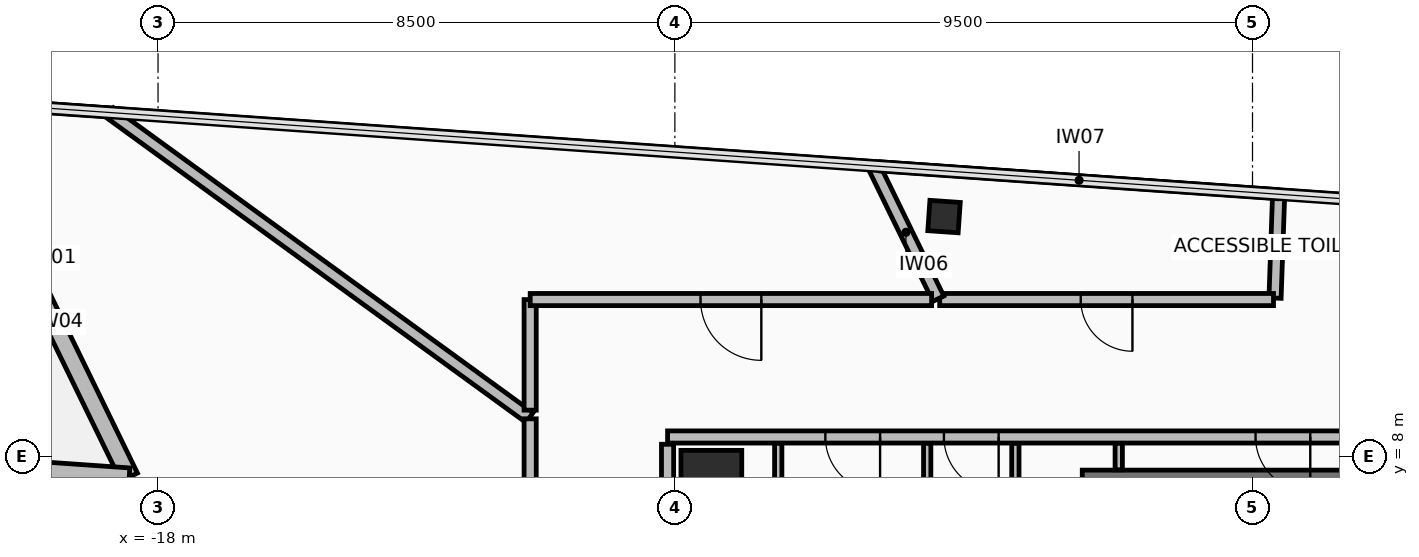
"""IFC4 building model, lengths in metres.
Left out: names, types, materials, properties, quantities, classifications, styles, units other than length and angle.
Written with IfcOpenShell. Run it as: python <this file> out.ifc"""

import sys

from ifc_helpers import new_model, si_unit, direction, frame, frame_2d, origin, origin_2d, place, context, subcontext, project, spatial, rectangle, hollow_rectangle, extrude, element, fill, save


model = new_model("IFC4")
c1 = context("Model", 3, precision=1e-05, world=origin(), true_north=direction((0.0, 1.0)))
c2 = subcontext(c1, "Body", "Model", "MODEL_VIEW")
j1 = project(units=[si_unit("LENGTHUNIT", "METRE"), si_unit("PLANEANGLEUNIT", "RADIAN")], contexts=[c1])
p1 = place(None, origin())
s1 = spatial("IfcSite", under=j1, at=p1, CompositionType="ELEMENT")
p2 = place(p1, origin())
s2 = spatial("IfcBuilding", under=s1, at=p2, CompositionType="ELEMENT")
p3 = place(p2, frame((0.0, 0.0, 237.85)))
s3 = spatial("IfcBuildingStorey", under=s2, at=p3, CompositionType="ELEMENT", Elevation=237.85)
p4 = place(p3, frame((-8.9, 7.6, 0.0), z_axis=(0.0, 0.0, 1.0), x_axis=(1.0, 0.0, 0.0)))
e1 = element("IfcColumn", 1, at=p4, inside=s3, PredefinedType="COLUMN", context=c2, shape_type="SweptSolid", body=[
    extrude(rectangle(XDim=1.0, YDim=1.0, at=origin_2d()), origin(), (0.0, 0.0, 1.0), 3.6),
])
p5 = place(p3, frame((-5.073, 11.945, 0.0), z_axis=(0.0, 0.0, 1.0), x_axis=(-0.99756405026, 0.069756473744, 0.0)))
e2 = element("IfcColumn", 2, at=p5, inside=s3, PredefinedType="COLUMN", context=c2, shape_type="SweptSolid", body=[
    extrude(hollow_rectangle(XDim=0.5, YDim=0.5, WallThickness=0.032, at=origin_2d()), origin(), (0.0, 0.0, 1.0), 3.6),
])
p6 = place(p3, frame((-21.49, 13.844, 0.0), z_axis=(0.0, 0.0, 1.0), x_axis=(0.438391471143, -0.898784133165, 0.0)))
e3 = element("IfcWall", 3, at=p6, inside=s3, PredefinedType="STANDARD", context=c2, shape_type="SweptSolid", body=[
    extrude(rectangle(XDim=6.88, YDim=0.3, at=frame_2d((3.44, 0.0))), origin(), (0.0, 0.0, 1.0), 2.765),
])
p7 = place(p6, frame((2.84, 0.0, 0.485)))
e4 = element("IfcOpeningElement", 4, at=p7, cuts=e3, PredefinedType="OPENING", context=c2, shape_type="SweptSolid", body=[
    extrude(rectangle(XDim=1.2, YDim=2.1, at=frame_2d((0.6, 1.05))), frame((0.0, 0.16, 0.0), z_axis=(0.0, -1.0, 0.0), x_axis=(1.0, 0.0, 0.0)), (0.0, 0.0, 1.0), 0.32),
])
p8 = place(p3, frame((-18.474, 7.661, 0.0), z_axis=(0.0, 0.0, 1.0), x_axis=(-0.997565982203, 0.069728840176, 0.0)))
e5 = element("IfcWall", 5, at=p8, inside=s3, PredefinedType="STANDARD", context=c2, shape_type="SweptSolid", body=[
    extrude(rectangle(XDim=6.88, YDim=0.3, at=frame_2d((3.44, 0.0))), origin(), (0.0, 0.0, 1.0), 2.765),
])
p9 = place(p8, frame((2.532, 0.0, 0.0)))
e6 = element("IfcOpeningElement", 6, at=p9, cuts=e5, PredefinedType="OPENING", context=c2, shape_type="SweptSolid", body=[
    extrude(rectangle(XDim=1.1, YDim=2.2, at=frame_2d((0.55, 1.1))), frame((0.0, 0.16, 0.0), z_axis=(0.0, -1.0, 0.0), x_axis=(1.0, 0.0, 0.0)), (0.0, 0.0, 1.0), 0.32),
])
p10 = place(p3, frame((-2.8, 7.6, 0.0), z_axis=(0.0, 0.0, 1.0), x_axis=(1.0, 0.0, 0.0)))
e7 = element("IfcWall", 7, at=p10, inside=s3, PredefinedType="SHEAR", context=c2, shape_type="SweptSolid", body=[
    extrude(rectangle(XDim=5.38, YDim=0.35, at=frame_2d((2.69, 0.0))), origin(), (0.0, 0.0, 1.0), 3.42),
])
p11 = place(p3, frame((9.62, 8.32, 0.0), z_axis=(0.0, 0.0, 1.0), x_axis=(-1.0, 0.0, 0.0)))
e8 = element("IfcWall", 8, at=p11, inside=s3, PredefinedType="PARTITIONING", context=c2, shape_type="SweptSolid", body=[
    extrude(rectangle(XDim=19.24, YDim=0.2, at=frame_2d((9.62, 0.0))), origin(), (0.0, 0.0, 1.0), 2.915),
])
p12 = place(p11, frame((8.67, 0.0, 0.0)))
e9 = element("IfcOpeningElement", 9, at=p12, cuts=e8, PredefinedType="OPENING", context=c2, shape_type="SweptSolid", body=[
    extrude(rectangle(XDim=0.9, YDim=2.1, at=frame_2d((0.45, 1.05))), frame((0.0, 0.11, 0.0), z_axis=(0.0, -1.0, 0.0), x_axis=(1.0, 0.0, 0.0)), (0.0, 0.0, 1.0), 0.22),
])
p13 = place(p11, frame((15.745, 0.0, 0.0)))
e10 = element("IfcOpeningElement", 10, at=p13, cuts=e8, PredefinedType="OPENING", context=c2, shape_type="SweptSolid", body=[
    extrude(rectangle(XDim=0.9, YDim=2.1, at=frame_2d((0.45, 1.05))), frame((0.0, 0.11, 0.0), z_axis=(0.0, -1.0, 0.0), x_axis=(1.0, 0.0, 0.0)), (0.0, 0.0, 1.0), 0.22),
])
p14 = place(p11, frame((13.795, 0.0, 0.0)))
e11 = element("IfcOpeningElement", 11, at=p14, cuts=e8, PredefinedType="OPENING", context=c2, shape_type="SweptSolid", body=[
    extrude(rectangle(XDim=0.9, YDim=2.1, at=frame_2d((0.45, 1.05))), frame((0.0, 0.11, 0.0), z_axis=(0.0, -1.0, 0.0), x_axis=(1.0, 0.0, 0.0)), (0.0, 0.0, 1.0), 0.22),
])
p15 = place(p3, frame((-9.62, 8.2, 0.0), z_axis=(0.0, 0.0, 1.0), x_axis=(0.0, -1.0, 0.0)))
e12 = element("IfcWall", 12, at=p15, inside=s3, PredefinedType="PARTITIONING", context=c2, shape_type="SweptSolid", body=[
    extrude(rectangle(XDim=16.4, YDim=0.2, at=frame_2d((8.2, 0.0))), origin(), (0.0, 0.0, 1.0), 2.765),
])
p16 = place(p15, frame((12.65, 0.0, 0.0)))
e13 = element("IfcOpeningElement", 13, at=p16, cuts=e12, PredefinedType="OPENING", context=c2, shape_type="SweptSolid", body=[
    extrude(rectangle(XDim=1.1, YDim=2.15, at=frame_2d((0.55, 1.075))), frame((0.0, 0.11, 0.0), z_axis=(0.0, -1.0, 0.0), x_axis=(1.0, 0.0, 0.0)), (0.0, 0.0, 1.0), 0.22),
])
p17 = place(p3, frame((-2.2, 8.215, 0.0), z_axis=(0.0, 0.0, 1.0), x_axis=(0.0, -1.0, 0.0)))
e14 = element("IfcWall", 14, at=p17, inside=s3, PredefinedType="PARTITIONING", context=c2, shape_type="SweptSolid", body=[
    extrude(rectangle(XDim=0.435, YDim=0.12, at=frame_2d((0.218, 0.0))), origin(), (0.0, 0.0, 1.0), 2.715),
])
for number, where, z_axis, x_axis in (
    (15, (-5.35, 4.765, 0.0), (0.0, 0.0, 1.0), (0.0, 1.0, 0.0)),
    (16, (-7.8, 8.215, 0.0), (0.0, 0.0, 1.0), (0.0, -1.0, 0.0)),
    (17, (-3.9, 4.765, 0.0), (0.0, 0.0, 1.0), (0.0, 1.0, 0.0)),
):
    element("IfcWall", number, at=place(p3, frame(where, z_axis=z_axis, x_axis=x_axis)), inside=s3, PredefinedType="PARTITIONING", context=c2, shape_type="SweptSolid", body=[
        extrude(rectangle(XDim=3.45, YDim=0.12, at=frame_2d((1.725, 0.0))), origin(), (0.0, 0.0, 1.0), 2.715),
    ])
p18 = place(p3, frame((0.429, 12.288, 0.0), z_axis=(0.0, 0.0, 1.0), x_axis=(-0.034926473635, -0.999389884599, 0.0)))
e18 = element("IfcWall", 18, at=p18, inside=s3, PredefinedType="PARTITIONING", context=c2, shape_type="SweptSolid", body=[
    extrude(rectangle(XDim=1.685, YDim=0.2, at=frame_2d((0.842, 0.0))), origin(), (0.0, 0.0, 1.0), 2.765),
])
p19 = place(p3, frame((0.345, 10.58, 0.0), z_axis=(0.0, 0.0, 1.0), x_axis=(-1.0, 0.0, 0.0)))
e19 = element("IfcWall", 19, at=p19, inside=s3, PredefinedType="PARTITIONING", context=c2, shape_type="SweptSolid", body=[
    extrude(rectangle(XDim=5.49, YDim=0.2, at=frame_2d((2.745, 0.0))), origin(), (0.0, 0.0, 1.0), 3.42),
])
p20 = place(p19, frame((2.32, 0.0, 0.0)))
e20 = element("IfcOpeningElement", 20, at=p20, cuts=e19, PredefinedType="OPENING", context=c2, shape_type="SweptSolid", body=[
    extrude(rectangle(XDim=0.85, YDim=2.1, at=frame_2d((0.425, 1.05))), frame((0.0, 0.11, 0.0), z_axis=(0.0, -1.0, 0.0), x_axis=(1.0, 0.0, 0.0)), (0.0, 0.0, 1.0), 0.22),
])
p21 = place(p3, frame((-5.167, 10.594, 0.0), z_axis=(0.0, 0.0, 1.0), x_axis=(-0.43834839389, 0.898805143273, 0.0)))
e21 = element("IfcWall", 21, at=p21, inside=s3, PredefinedType="PARTITIONING", context=c2, shape_type="SweptSolid", body=[
    extrude(rectangle(XDim=2.429, YDim=0.2, at=frame_2d((1.215, 0.0))), origin(), (0.0, 0.0, 1.0), 2.765),
])
p22 = place(p3, frame((-6.111, 12.769, 0.0), z_axis=(0.0, 0.0, 1.0), x_axis=(0.997565678714, -0.069733181857, 0.0)))
e22 = element("IfcWall", 22, at=p22, inside=s3, PredefinedType="PARTITIONING", context=c2, shape_type="SweptSolid", body=[
    extrude(rectangle(XDim=6.533, YDim=0.15, at=frame_2d((3.267, 0.0))), origin(), (0.0, 0.0, 1.0), 3.42),
])
p23 = place(p3, frame((-21.311, 13.832, 0.0), z_axis=(0.0, 0.0, 1.0), x_axis=(0.997559711148, -0.06981849823, 0.0)))
e23 = element("IfcWall", 23, at=p23, inside=s3, PredefinedType="PARTITIONING", context=c2, shape_type="SweptSolid", body=[
    extrude(rectangle(XDim=2.514, YDim=0.15, at=frame_2d((1.257, 0.0))), origin(), (0.0, 0.0, 1.0), 3.42),
])
p24 = place(p3, frame((-18.79, 13.652, 0.0), z_axis=(0.0, 0.0, 1.0), x_axis=(0.809024412074, -0.58777504257, 0.0)))
e24 = element("IfcWall", 24, at=p24, inside=s3, PredefinedType="PARTITIONING", context=c2, shape_type="SweptSolid", body=[
    extrude(rectangle(XDim=8.529, YDim=0.2, at=frame_2d((4.264, 0.0))), origin(), (0.0, 0.0, 1.0), 2.765),
])
p25 = place(p3, frame((-11.88, 8.619, 0.0), z_axis=(0.0, 0.0, 1.0), x_axis=(0.0, -1.0, 0.0)))
e25 = element("IfcWall", 25, at=p25, inside=s3, PredefinedType="PARTITIONING", context=c2, shape_type="SweptSolid", body=[
    extrude(rectangle(XDim=6.92, YDim=0.2, at=frame_2d((3.46, 0.0))), origin(), (0.0, 0.0, 1.0), 2.765),
])
p26 = place(p25, frame((3.035, 0.0, 0.0)))
e26 = element("IfcOpeningElement", 26, at=p26, cuts=e25, PredefinedType="OPENING", context=c2, shape_type="SweptSolid", body=[
    extrude(rectangle(XDim=0.85, YDim=2.1, at=frame_2d((0.425, 1.05))), frame((0.0, 0.11, 0.0), z_axis=(0.0, -1.0, 0.0), x_axis=(1.0, 0.0, 0.0)), (0.0, 0.0, 1.0), 0.22),
])
p27 = place(p3, frame((-11.88, 10.579, 0.0), z_axis=(0.0, 0.0, 1.0), x_axis=(0.0, -1.0, 0.0)))
e27 = element("IfcWall", 27, at=p27, inside=s3, PredefinedType="PARTITIONING", context=c2, shape_type="SweptSolid", body=[
    extrude(rectangle(XDim=1.818, YDim=0.2, at=frame_2d((0.909, 0.0))), origin(), (0.0, 0.0, 1.0), 2.915),
])
p28 = place(p3, frame((-5.277, 10.58, 0.0), z_axis=(0.0, 0.0, 1.0), x_axis=(-1.0, 0.0, 0.0)))
e28 = element("IfcWall", 28, at=p28, inside=s3, PredefinedType="PARTITIONING", context=c2, shape_type="SweptSolid", body=[
    extrude(rectangle(XDim=6.602, YDim=0.2, at=frame_2d((3.301, 0.0))), origin(), (0.0, 0.0, 1.0), 2.915),
])
p29 = place(p28, frame((2.801, 0.0, 0.0)))
e29 = element("IfcOpeningElement", 29, at=p29, cuts=e28, PredefinedType="OPENING", context=c2, shape_type="SweptSolid", body=[
    extrude(rectangle(XDim=1.0, YDim=2.15, at=frame_2d((0.5, 1.075))), frame((0.0, 0.11, 0.0), z_axis=(0.0, -1.0, 0.0), x_axis=(1.0, 0.0, 0.0)), (0.0, 0.0, 1.0), 0.22),
])
p30 = place(p7, origin())
e30 = element("IfcWindow", 30, at=p30, inside=s3, PartitioningType="SINGLE_PANEL", PredefinedType="WINDOW", context=c2, shape_type="SweptSolid", body=[
    extrude(rectangle(XDim=1.2, YDim=2.1, at=frame_2d((0.6, 1.05))), frame((0.0, 0.03, 0.0), z_axis=(0.0, -1.0, 0.0), x_axis=(1.0, 0.0, 0.0)), (0.0, 0.0, 1.0), 0.06),
])
fill(e4, e30)
p31 = place(p12, origin())
e31 = element("IfcDoor", 31, at=p31, inside=s3, OperationType="SINGLE_SWING_LEFT", PredefinedType="DOOR", context=c2, shape_type="SweptSolid", body=[
    extrude(rectangle(XDim=0.9, YDim=2.1, at=frame_2d((0.45, 1.05))), frame((0.0, 0.025, 0.0), z_axis=(0.0, -1.0, 0.0), x_axis=(1.0, 0.0, 0.0)), (0.0, 0.0, 1.0), 0.05),
])
fill(e9, e31)
p32 = place(p13, origin())
e32 = element("IfcDoor", 32, at=p32, inside=s3, OperationType="SINGLE_SWING_LEFT", PredefinedType="DOOR", context=c2, shape_type="SweptSolid", body=[
    extrude(rectangle(XDim=0.9, YDim=2.1, at=frame_2d((0.45, 1.05))), frame((0.0, 0.025, 0.0), z_axis=(0.0, -1.0, 0.0), x_axis=(1.0, 0.0, 0.0)), (0.0, 0.0, 1.0), 0.05),
])
fill(e10, e32)
p33 = place(p14, origin())
e33 = element("IfcDoor", 33, at=p33, inside=s3, OperationType="SINGLE_SWING_LEFT", PredefinedType="DOOR", context=c2, shape_type="SweptSolid", body=[
    extrude(rectangle(XDim=0.9, YDim=2.1, at=frame_2d((0.45, 1.05))), frame((0.0, 0.025, 0.0), z_axis=(0.0, -1.0, 0.0), x_axis=(1.0, 0.0, 0.0)), (0.0, 0.0, 1.0), 0.05),
])
fill(e11, e33)
p34 = place(p20, origin())
e34 = element("IfcDoor", 34, at=p34, inside=s3, OperationType="SINGLE_SWING_RIGHT", PredefinedType="DOOR", context=c2, shape_type="SweptSolid", body=[
    extrude(rectangle(XDim=0.85, YDim=2.1, at=frame_2d((0.425, 1.05))), frame((0.0, 0.025, 0.0), z_axis=(0.0, -1.0, 0.0), x_axis=(1.0, 0.0, 0.0)), (0.0, 0.0, 1.0), 0.05),
])
fill(e20, e34)
p35 = place(p29, origin())
e35 = element("IfcDoor", 35, at=p35, inside=s3, OperationType="SINGLE_SWING_RIGHT", PredefinedType="DOOR", context=c2, shape_type="SweptSolid", body=[
    extrude(rectangle(XDim=1.0, YDim=2.15, at=frame_2d((0.5, 1.075))), frame((0.0, 0.025, 0.0), z_axis=(0.0, -1.0, 0.0), x_axis=(1.0, 0.0, 0.0)), (0.0, 0.0, 1.0), 0.05),
])
fill(e29, e35)
save(model, sys.argv[1])
